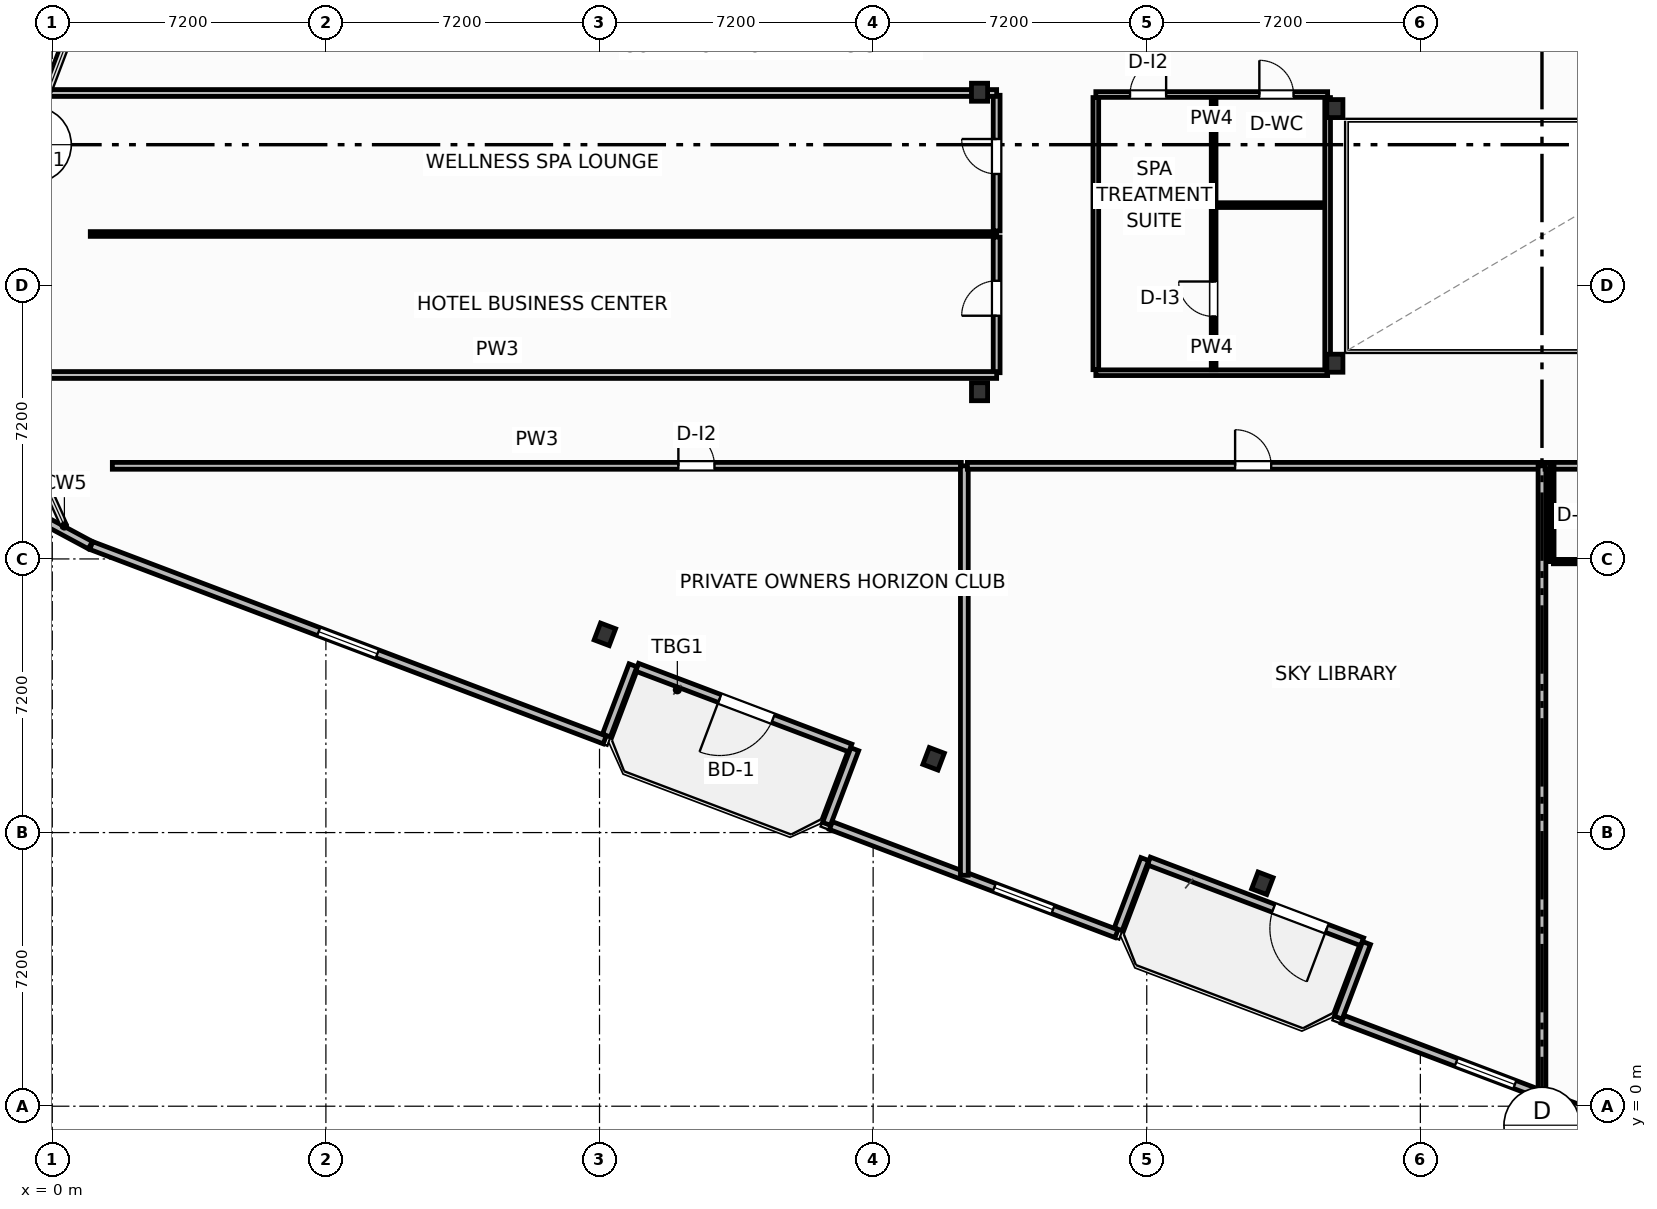
"""IFC4 building model, lengths in metres.
Left out: names, types, materials, properties, quantities, classifications, styles, units other than length and angle.
Written with IfcOpenShell. Run it as: python <this file> out.ifc"""

import sys

from ifc_helpers import new_model, si_unit, direction, frame, frame_2d, origin, origin_2d, place, context, subcontext, project, spatial, rectangle, i_section, extrude, element, fill, save


model = new_model("IFC4")
c1 = context("Model", 3, precision=1e-05, world=origin(), true_north=direction((0.0, 1.0)))
c2 = subcontext(c1, "Body", "Model", "MODEL_VIEW")
j1 = project(units=[si_unit("LENGTHUNIT", "METRE"), si_unit("PLANEANGLEUNIT", "RADIAN")], contexts=[c1])
p1 = place(None, origin())
s1 = spatial("IfcSite", under=j1, at=p1, CompositionType="ELEMENT")
p2 = place(p1, origin())
s2 = spatial("IfcBuilding", under=s1, at=p2, CompositionType="ELEMENT")
p3 = place(p2, frame((0.0, 0.0, 105.8)))
s3 = spatial("IfcBuildingStorey", under=s2, at=p3, CompositionType="ELEMENT", Elevation=105.8)
for number, where, z_axis, x_axis in (
    (1, (33.75, 19.55, 0.0), (0.0, 0.0, 1.0), (1.0, 0.0, 0.0)),
    (2, (33.75, 26.25, 0.0), (0.0, 0.0, 1.0), (1.0, 0.0, 0.0)),
    (3, (24.4, 18.8, 0.0), (0.0, 0.0, 1.0), (1.0, 0.0, 0.0)),
    (4, (24.4, 26.68, 0.0), (0.0, 0.0, 1.0), (1.0, 0.0, 0.0)),
    (5, (14.541, 12.416, 0.0), (0.0, 0.0, 1.0), (0.935, -0.354, 0.0)),
    (6, (23.192, 9.141, 0.0), (0.0, 0.0, 1.0), (0.935, -0.354, 0.0)),
    (7, (31.843, 5.866, 0.0), (0.0, 0.0, 1.0), (0.935, -0.354, 0.0)),
):
    element("IfcColumn", number, at=place(p3, frame(where, z_axis=z_axis, x_axis=x_axis)), inside=s3, PredefinedType="COLUMN", context=c2, shape_type="SweptSolid", body=[
        extrude(i_section(OverallWidth=0.424, OverallDepth=0.474, WebThickness=0.048, FlangeThickness=0.077, FilletRadius=0.025, at=origin_2d()), origin(), (0.0, 0.0, 1.0), 3.7),
    ])
p4 = place(p3, frame((21.0, 9.425, 0.0), z_axis=(0.0, 0.0, 1.0), x_axis=(-0.93521416643, 0.354082565101, 0.0)))
e8 = element("IfcWall", 8, at=p4, inside=s3, PredefinedType="SOLIDWALL", context=c2, shape_type="SweptSolid", body=[
    extrude(rectangle(XDim=6.0, YDim=0.22, at=frame_2d((3.0, 0.0))), origin(), (0.0, 0.0, 1.0), 2.73),
])
p5 = place(p4, frame((2.176, 0.0, 0.0)))
e9 = element("IfcOpeningElement", 9, at=p5, cuts=e8, PredefinedType="OPENING", context=c2, shape_type="SweptSolid", body=[
    extrude(rectangle(XDim=1.5, YDim=2.25, at=frame_2d((0.75, 1.125))), frame((0.0, 0.12, 0.0), z_axis=(0.0, -1.0, 0.0), x_axis=(1.0, 0.0, 0.0)), (0.0, 0.0, 1.0), 0.24),
])
p6 = place(p3, frame((34.468, 4.327, 0.0), z_axis=(0.0, 0.0, 1.0), x_axis=(-0.9352192676, 0.354069091436, 0.0)))
e10 = element("IfcWall", 10, at=p6, inside=s3, PredefinedType="SOLIDWALL", context=c2, shape_type="SweptSolid", body=[
    extrude(rectangle(XDim=6.0, YDim=0.22, at=frame_2d((3.0, 0.0))), origin(), (0.0, 0.0, 1.0), 2.73),
])
p7 = place(p6, frame((0.992, 0.0, 0.0)))
e11 = element("IfcOpeningElement", 11, at=p7, cuts=e10, PredefinedType="OPENING", context=c2, shape_type="SweptSolid", body=[
    extrude(rectangle(XDim=1.5, YDim=2.25, at=frame_2d((0.75, 1.125))), frame((0.0, 0.12, 0.0), z_axis=(0.0, -1.0, 0.0), x_axis=(1.0, 0.0, 0.0)), (0.0, 0.0, 1.0), 0.24),
])
p8 = place(p3, frame((-0.197, 15.406, 0.0), z_axis=(0.0, 0.0, 1.0), x_axis=(0.881023507585, -0.47307248819, 0.0)))
e12 = element("IfcWall", 12, at=p8, inside=s3, PredefinedType="SOLIDWALL", context=c2, shape_type="SweptSolid", body=[
    extrude(rectangle(XDim=1.361, YDim=0.22, at=frame_2d((0.68, 0.0))), origin(), (0.0, 0.0, 1.0), 2.73),
])
p9 = place(p3, frame((1.026, 14.753, 0.0), z_axis=(0.0, 0.0, 1.0), x_axis=(0.935222448475, -0.354060689526, 0.0)))
e13 = element("IfcWall", 13, at=p9, inside=s3, PredefinedType="SOLIDWALL", context=c2, shape_type="SweptSolid", body=[
    extrude(rectangle(XDim=14.447, YDim=0.22, at=frame_2d((7.224, 0.0))), origin(), (0.0, 0.0, 1.0), 2.73),
])
p10 = place(p9, frame((6.399, 0.0, 0.8)))
e14 = element("IfcOpeningElement", 14, at=p10, cuts=e13, PredefinedType="OPENING", context=c2, shape_type="SweptSolid", body=[
    extrude(rectangle(XDim=1.65, YDim=1.65, at=frame_2d((0.825, 0.825))), frame((0.0, 0.12, 0.0), z_axis=(0.0, -1.0, 0.0), x_axis=(1.0, 0.0, 0.0)), (0.0, 0.0, 1.0), 0.24),
])
p11 = place(p3, frame((14.581, 9.755, 0.0), z_axis=(0.0, 0.0, 1.0), x_axis=(0.354061611705, 0.935222099352, 0.0)))
e15 = element("IfcWall", 15, at=p11, inside=s3, PredefinedType="SOLIDWALL", context=c2, shape_type="SweptSolid", body=[
    extrude(rectangle(XDim=1.975, YDim=0.22, at=frame_2d((0.987, 0.0))), origin(), (0.0, 0.0, 1.0), 2.73),
])
p12 = place(p3, frame((21.116, 9.392, 0.0), z_axis=(0.0, 0.0, 1.0), x_axis=(-0.353988291547, -0.935249854022, 0.0)))
e16 = element("IfcWall", 16, at=p12, inside=s3, PredefinedType="SOLIDWALL", context=c2, shape_type="SweptSolid", body=[
    extrude(rectangle(XDim=2.1, YDim=0.22, at=frame_2d((1.05, 0.0))), origin(), (0.0, 0.0, 1.0), 2.73),
])
p13 = place(p3, frame((20.49, 7.384, 0.0), z_axis=(0.0, 0.0, 1.0), x_axis=(0.935230796934, -0.354038636968, 0.0)))
e17 = element("IfcWall", 17, at=p13, inside=s3, PredefinedType="SOLIDWALL", context=c2, shape_type="SweptSolid", body=[
    extrude(rectangle(XDim=8.035, YDim=0.22, at=frame_2d((4.018, 0.0))), origin(), (0.0, 0.0, 1.0), 2.73),
])
p14 = place(p13, frame((4.597, 0.0, 0.8)))
e18 = element("IfcOpeningElement", 18, at=p14, cuts=e17, PredefinedType="OPENING", context=c2, shape_type="SweptSolid", body=[
    extrude(rectangle(XDim=1.65, YDim=1.65, at=frame_2d((0.825, 0.825))), frame((0.0, 0.12, 0.0), z_axis=(0.0, -1.0, 0.0), x_axis=(1.0, 0.0, 0.0)), (0.0, 0.0, 1.0), 0.24),
])
p15 = place(p3, frame((28.048, 4.656, 0.0), z_axis=(0.0, 0.0, 1.0), x_axis=(0.354128791944, 0.935196663123, 0.0)))
e19 = element("IfcWall", 19, at=p15, inside=s3, PredefinedType="SOLIDWALL", context=c2, shape_type="SweptSolid", body=[
    extrude(rectangle(XDim=1.975, YDim=0.22, at=frame_2d((0.988, 0.0))), origin(), (0.0, 0.0, 1.0), 2.73),
])
p16 = place(p3, frame((34.583, 4.294, 0.0), z_axis=(0.0, 0.0, 1.0), x_axis=(-0.354128469405, -0.935196785258, 0.0)))
e20 = element("IfcWall", 20, at=p16, inside=s3, PredefinedType="SOLIDWALL", context=c2, shape_type="SweptSolid", body=[
    extrude(rectangle(XDim=2.1, YDim=0.22, at=frame_2d((1.05, 0.0))), origin(), (0.0, 0.0, 1.0), 2.73),
])
p17 = place(p3, frame((33.957, 2.286, 0.0), z_axis=(0.0, 0.0, 1.0), x_axis=(0.935220736163, -0.354065212427, 0.0)))
e21 = element("IfcWall", 21, at=p17, inside=s3, PredefinedType="SOLIDWALL", context=c2, shape_type="SweptSolid", body=[
    extrude(rectangle(XDim=8.035, YDim=0.22, at=frame_2d((4.018, 0.0))), origin(), (0.0, 0.0, 1.0), 2.73),
])
p18 = place(p17, frame((3.192, 0.0, 0.8)))
e22 = element("IfcOpeningElement", 22, at=p18, cuts=e21, PredefinedType="OPENING", context=c2, shape_type="SweptSolid", body=[
    extrude(rectangle(XDim=1.65, YDim=1.65, at=frame_2d((0.825, 0.825))), frame((0.0, 0.12, 0.0), z_axis=(0.0, -1.0, 0.0), x_axis=(1.0, 0.0, 0.0)), (0.0, 0.0, 1.0), 0.24),
])
p19 = place(p3, frame((1.58, 16.85, 0.0), z_axis=(0.0, 0.0, 1.0), x_axis=(1.0, 0.0, 0.0)))
e23 = element("IfcWall", 23, at=p19, inside=s3, PredefinedType="PARTITIONING", context=c2, shape_type="SweptSolid", body=[
    extrude(rectangle(XDim=22.34, YDim=0.18, at=frame_2d((11.17, 0.0))), origin(), (0.0, 0.0, 1.0), 3.45),
])
p20 = place(p19, frame((14.895, 0.0, 0.0)))
e24 = element("IfcOpeningElement", 24, at=p20, cuts=e23, PredefinedType="OPENING", context=c2, shape_type="SweptSolid", body=[
    extrude(rectangle(XDim=0.95, YDim=2.05, at=frame_2d((0.475, 1.025))), frame((0.0, 0.1, 0.0), z_axis=(0.0, -1.0, 0.0), x_axis=(1.0, 0.0, 0.0)), (0.0, 0.0, 1.0), 0.2),
])
p21 = place(p3, frame((24.0, 6.076, 0.0), z_axis=(0.0, 0.0, 1.0), x_axis=(0.0, 1.0, 0.0)))
e25 = element("IfcWall", 25, at=p21, inside=s3, PredefinedType="PARTITIONING", context=c2, shape_type="SweptSolid", body=[
    extrude(rectangle(XDim=10.774, YDim=0.205, at=frame_2d((5.387, 0.0))), origin(), (0.0, 0.0, 1.0), 2.58),
])
p22 = place(p3, frame((24.08, 16.85, 0.0), z_axis=(0.0, 0.0, 1.0), x_axis=(1.0, 0.0, 0.0)))
e26 = element("IfcWall", 26, at=p22, inside=s3, PredefinedType="PARTITIONING", context=c2, shape_type="SweptSolid", body=[
    extrude(rectangle(XDim=15.04, YDim=0.18, at=frame_2d((7.52, 0.0))), origin(), (0.0, 0.0, 1.0), 3.45),
])
p23 = place(p22, frame((7.045, 0.0, 0.0)))
e27 = element("IfcOpeningElement", 27, at=p23, cuts=e26, PredefinedType="OPENING", context=c2, shape_type="SweptSolid", body=[
    extrude(rectangle(XDim=0.95, YDim=2.05, at=frame_2d((0.475, 1.025))), frame((0.0, 0.1, 0.0), z_axis=(0.0, -1.0, 0.0), x_axis=(1.0, 0.0, 0.0)), (0.0, 0.0, 1.0), 0.2),
])
p24 = place(p3, frame((39.2, 0.322, 0.0), z_axis=(0.0, 0.0, 1.0), x_axis=(0.0, 1.0, 0.0)))
e28 = element("IfcWall", 28, at=p24, inside=s3, PredefinedType="PARTITIONING", context=c2, shape_type="SweptSolid", body=[
    extrude(rectangle(XDim=16.528, YDim=0.205, at=frame_2d((8.264, 0.0))), origin(), (0.0, 0.0, 1.0), 3.45),
])
p25 = place(p3, frame((39.28, 16.85, 0.0), z_axis=(0.0, 0.0, 1.0), x_axis=(1.0, 0.0, 0.0)))
e29 = element("IfcWall", 29, at=p25, inside=s3, PredefinedType="PARTITIONING", context=c2, shape_type="SweptSolid", body=[
    extrude(rectangle(XDim=14.64, YDim=0.18, at=frame_2d((7.32, 0.0))), origin(), (0.0, 0.0, 1.0), 3.45),
])
p26 = place(p25, frame((3.322, 0.0, 0.0)))
e30 = element("IfcOpeningElement", 30, at=p26, cuts=e29, PredefinedType="OPENING", context=c2, shape_type="SweptSolid", body=[
    extrude(rectangle(XDim=0.95, YDim=2.15, at=frame_2d((0.475, 1.075))), frame((0.0, 0.1, 0.0), z_axis=(0.0, -1.0, 0.0), x_axis=(1.0, 0.0, 0.0)), (0.0, 0.0, 1.0), 0.2),
])
p27 = place(p3, frame((39.5, 14.33, 0.0), z_axis=(0.0, 0.0, 1.0), x_axis=(1.0, 0.0, 0.0)))
e31 = element("IfcWall", 31, at=p27, inside=s3, PredefinedType="PARTITIONING", context=c2, shape_type="SweptSolid", body=[
    extrude(rectangle(XDim=2.15, YDim=0.115, at=frame_2d((1.075, 0.0))), origin(), (0.0, 0.0, 1.0), 3.45),
])
p28 = place(p3, frame((39.46, 14.33, 0.0), z_axis=(0.0, 0.0, 1.0), x_axis=(0.0, 1.0, 0.0)))
e32 = element("IfcWall", 32, at=p28, inside=s3, PredefinedType="PARTITIONING", context=c2, shape_type="SweptSolid", body=[
    extrude(rectangle(XDim=2.52, YDim=0.115, at=frame_2d((1.26, 0.0))), origin(), (0.0, 0.0, 1.0), 3.45),
])
p29 = place(p3, frame((24.85, 19.3, 0.0), z_axis=(0.0, 0.0, 1.0), x_axis=(0.0, 1.0, 0.0)))
e33 = element("IfcWall", 33, at=p29, inside=s3, PredefinedType="PARTITIONING", context=c2, shape_type="SweptSolid", body=[
    extrude(rectangle(XDim=3.57, YDim=0.18, at=frame_2d((1.785, 0.0))), origin(), (0.0, 0.0, 1.0), 3.45),
])
p30 = place(p29, frame((1.5, 0.0, 0.0)))
e34 = element("IfcOpeningElement", 34, at=p30, cuts=e33, PredefinedType="OPENING", context=c2, shape_type="SweptSolid", body=[
    extrude(rectangle(XDim=0.92, YDim=2.05, at=frame_2d((0.46, 1.025))), frame((0.0, 0.1, 0.0), z_axis=(0.0, -1.0, 0.0), x_axis=(1.0, 0.0, 0.0)), (0.0, 0.0, 1.0), 0.2),
])
p31 = place(p3, frame((24.85, 23.03, 0.0), z_axis=(0.0, 0.0, 1.0), x_axis=(0.0, 1.0, 0.0)))
e35 = element("IfcWall", 35, at=p31, inside=s3, PredefinedType="PARTITIONING", context=c2, shape_type="SweptSolid", body=[
    extrude(rectangle(XDim=3.57, YDim=0.18, at=frame_2d((1.785, 0.0))), origin(), (0.0, 0.0, 1.0), 3.45),
])
p32 = place(p31, frame((1.5, 0.0, 0.0)))
e36 = element("IfcOpeningElement", 36, at=p32, cuts=e35, PredefinedType="OPENING", context=c2, shape_type="SweptSolid", body=[
    extrude(rectangle(XDim=0.92, YDim=2.05, at=frame_2d((0.46, 1.025))), frame((0.0, 0.1, 0.0), z_axis=(0.0, -1.0, 0.0), x_axis=(1.0, 0.0, 0.0)), (0.0, 0.0, 1.0), 0.2),
])
p33 = place(p3, frame((1.0, 22.95, 0.0), z_axis=(0.0, 0.0, 1.0), x_axis=(1.0, 0.0, 0.0)))
e37 = element("IfcWall", 37, at=p33, inside=s3, PredefinedType="PARTITIONING", context=c2, shape_type="SweptSolid", body=[
    extrude(rectangle(XDim=23.85, YDim=0.125, at=frame_2d((11.925, 0.0))), origin(), (0.0, 0.0, 1.0), 3.45),
])
p34 = place(p3, frame((-1.432, 19.24, 0.0), z_axis=(0.0, 0.0, 1.0), x_axis=(1.0, 0.0, 0.0)))
e38 = element("IfcWall", 38, at=p34, inside=s3, PredefinedType="PARTITIONING", context=c2, shape_type="SweptSolid", body=[
    extrude(rectangle(XDim=26.282, YDim=0.18, at=frame_2d((13.141, 0.0))), origin(), (0.0, 0.0, 1.0), 3.45),
])
p35 = place(p3, frame((-0.086, 26.66, 0.0), z_axis=(0.0, 0.0, 1.0), x_axis=(1.0, 0.0, 0.0)))
e39 = element("IfcWall", 39, at=p35, inside=s3, PredefinedType="PARTITIONING", context=c2, shape_type="SweptSolid", body=[
    extrude(rectangle(XDim=24.936, YDim=0.18, at=frame_2d((12.468, 0.0))), origin(), (0.0, 0.0, 1.0), 2.662),
])
p36 = place(p3, frame((27.46, 26.62, 0.0), z_axis=(0.0, 0.0, 1.0), x_axis=(1.0, 0.0, 0.0)))
e40 = element("IfcWall", 40, at=p36, inside=s3, PredefinedType="PARTITIONING", context=c2, shape_type="SweptSolid", body=[
    extrude(rectangle(XDim=6.1, YDim=0.15, at=frame_2d((3.05, 0.0))), origin(), (0.0, 0.0, 1.0), 2.662),
])
p37 = place(p36, frame((0.9, 0.0, 0.0)))
e41 = element("IfcOpeningElement", 41, at=p37, cuts=e40, PredefinedType="OPENING", context=c2, shape_type="SweptSolid", body=[
    extrude(rectangle(XDim=0.95, YDim=2.05, at=frame_2d((0.475, 1.025))), frame((0.0, 0.085, 0.0), z_axis=(0.0, -1.0, 0.0), x_axis=(1.0, 0.0, 0.0)), (0.0, 0.0, 1.0), 0.17),
])
p38 = place(p36, frame((4.303, 0.0, 0.0)))
e42 = element("IfcOpeningElement", 42, at=p38, cuts=e40, PredefinedType="OPENING", context=c2, shape_type="SweptSolid", body=[
    extrude(rectangle(XDim=0.9, YDim=2.05, at=frame_2d((0.45, 1.025))), frame((0.0, 0.085, 0.0), z_axis=(0.0, -1.0, 0.0), x_axis=(1.0, 0.0, 0.0)), (0.0, 0.0, 1.0), 0.17),
])
p39 = place(p3, frame((27.46, 19.3, 0.0), z_axis=(0.0, 0.0, 1.0), x_axis=(1.0, 0.0, 0.0)))
e43 = element("IfcWall", 43, at=p39, inside=s3, PredefinedType="PARTITIONING", context=c2, shape_type="SweptSolid", body=[
    extrude(rectangle(XDim=6.1, YDim=0.15, at=frame_2d((3.05, 0.0))), origin(), (0.0, 0.0, 1.0), 2.662),
])
p40 = place(p3, frame((30.56, 19.38, 0.0), z_axis=(0.0, 0.0, 1.0), x_axis=(0.0, 1.0, 0.0)))
e44 = element("IfcWall", 44, at=p40, inside=s3, PredefinedType="PARTITIONING", context=c2, shape_type="SweptSolid", body=[
    extrude(rectangle(XDim=7.16, YDim=0.125, at=frame_2d((3.58, 0.0))), origin(), (0.0, 0.0, 1.0), 3.45),
])
p41 = place(p40, frame((1.4, 0.0, 0.0)))
e45 = element("IfcOpeningElement", 45, at=p41, cuts=e44, PredefinedType="OPENING", context=c2, shape_type="SweptSolid", body=[
    extrude(rectangle(XDim=0.92, YDim=2.05, at=frame_2d((0.46, 1.025))), frame((0.0, 0.073, 0.0), z_axis=(0.0, -1.0, 0.0), x_axis=(1.0, 0.0, 0.0)), (0.0, 0.0, 1.0), 0.145),
])
p42 = place(p3, frame((30.64, 23.71, 0.0), z_axis=(0.0, 0.0, 1.0), x_axis=(1.0, 0.0, 0.0)))
e46 = element("IfcWall", 46, at=p42, inside=s3, PredefinedType="PARTITIONING", context=c2, shape_type="SweptSolid", body=[
    extrude(rectangle(XDim=2.88, YDim=0.125, at=frame_2d((1.44, 0.0))), origin(), (0.0, 0.0, 1.0), 3.45),
])
p43 = place(p3, frame((27.46, 19.38, 0.0), z_axis=(0.0, 0.0, 1.0), x_axis=(0.0, 1.0, 0.0)))
e47 = element("IfcWall", 47, at=p43, inside=s3, PredefinedType="PARTITIONING", context=c2, shape_type="SweptSolid", body=[
    extrude(rectangle(XDim=7.16, YDim=0.15, at=frame_2d((3.58, 0.0))), origin(), (0.0, 0.0, 1.0), 3.45),
])
p44 = place(p3, frame((33.56, 19.38, 0.0), z_axis=(0.0, 0.0, 1.0), x_axis=(0.0, 1.0, 0.0)))
e48 = element("IfcWall", 48, at=p44, inside=s3, PredefinedType="PARTITIONING", context=c2, shape_type="SweptSolid", body=[
    extrude(rectangle(XDim=7.16, YDim=0.15, at=frame_2d((3.58, 0.0))), origin(), (0.0, 0.0, 1.0), 2.824),
])
p45 = place(p5, origin())
e49 = element("IfcDoor", 49, at=p45, inside=s3, OperationType="SINGLE_SWING_RIGHT", PredefinedType="DOOR", context=c2, shape_type="SweptSolid", body=[
    extrude(rectangle(XDim=1.5, YDim=2.25, at=frame_2d((0.75, 1.125))), frame((0.0, 0.025, 0.0), z_axis=(0.0, -1.0, 0.0), x_axis=(1.0, 0.0, 0.0)), (0.0, 0.0, 1.0), 0.05),
])
fill(e9, e49)
p46 = place(p7, origin())
e50 = element("IfcDoor", 50, at=p46, inside=s3, OperationType="SINGLE_SWING_LEFT", PredefinedType="DOOR", context=c2, shape_type="SweptSolid", body=[
    extrude(rectangle(XDim=1.5, YDim=2.25, at=frame_2d((0.75, 1.125))), frame((0.0, 0.025, 0.0), z_axis=(0.0, -1.0, 0.0), x_axis=(1.0, 0.0, 0.0)), (0.0, 0.0, 1.0), 0.05),
])
fill(e11, e50)
p47 = place(p10, origin())
e51 = element("IfcWindow", 51, at=p47, inside=s3, PartitioningType="SINGLE_PANEL", PredefinedType="WINDOW", context=c2, shape_type="SweptSolid", body=[
    extrude(rectangle(XDim=1.65, YDim=1.65, at=frame_2d((0.825, 0.825))), frame((0.0, 0.03, 0.0), z_axis=(0.0, -1.0, 0.0), x_axis=(1.0, 0.0, 0.0)), (0.0, 0.0, 1.0), 0.06),
])
fill(e14, e51)
p48 = place(p14, origin())
e52 = element("IfcWindow", 52, at=p48, inside=s3, PartitioningType="SINGLE_PANEL", PredefinedType="WINDOW", context=c2, shape_type="SweptSolid", body=[
    extrude(rectangle(XDim=1.65, YDim=1.65, at=frame_2d((0.825, 0.825))), frame((0.0, 0.03, 0.0), z_axis=(0.0, -1.0, 0.0), x_axis=(1.0, 0.0, 0.0)), (0.0, 0.0, 1.0), 0.06),
])
fill(e18, e52)
p49 = place(p18, origin())
e53 = element("IfcWindow", 53, at=p49, inside=s3, PartitioningType="SINGLE_PANEL", PredefinedType="WINDOW", context=c2, shape_type="SweptSolid", body=[
    extrude(rectangle(XDim=1.65, YDim=1.65, at=frame_2d((0.825, 0.825))), frame((0.0, 0.03, 0.0), z_axis=(0.0, -1.0, 0.0), x_axis=(1.0, 0.0, 0.0)), (0.0, 0.0, 1.0), 0.06),
])
fill(e22, e53)
p50 = place(p20, origin())
e54 = element("IfcDoor", 54, at=p50, inside=s3, OperationType="SINGLE_SWING_LEFT", PredefinedType="DOOR", context=c2, shape_type="SweptSolid", body=[
    extrude(rectangle(XDim=0.95, YDim=2.05, at=frame_2d((0.475, 1.025))), frame((0.0, 0.025, 0.0), z_axis=(0.0, -1.0, 0.0), x_axis=(1.0, 0.0, 0.0)), (0.0, 0.0, 1.0), 0.05),
])
fill(e24, e54)
p51 = place(p23, origin())
e55 = element("IfcDoor", 55, at=p51, inside=s3, OperationType="SINGLE_SWING_LEFT", PredefinedType="DOOR", context=c2, shape_type="SweptSolid", body=[
    extrude(rectangle(XDim=0.95, YDim=2.05, at=frame_2d((0.475, 1.025))), frame((0.0, 0.025, 0.0), z_axis=(0.0, -1.0, 0.0), x_axis=(1.0, 0.0, 0.0)), (0.0, 0.0, 1.0), 0.05),
])
fill(e27, e55)
p52 = place(p30, origin())
e56 = element("IfcDoor", 56, at=p52, inside=s3, OperationType="SINGLE_SWING_LEFT", PredefinedType="DOOR", context=c2, shape_type="SweptSolid", body=[
    extrude(rectangle(XDim=0.92, YDim=2.05, at=frame_2d((0.46, 1.025))), frame((0.0, 0.025, 0.0), z_axis=(0.0, -1.0, 0.0), x_axis=(1.0, 0.0, 0.0)), (0.0, 0.0, 1.0), 0.05),
])
fill(e34, e56)
p53 = place(p32, origin())
e57 = element("IfcDoor", 57, at=p53, inside=s3, OperationType="SINGLE_SWING_RIGHT", PredefinedType="DOOR", context=c2, shape_type="SweptSolid", body=[
    extrude(rectangle(XDim=0.92, YDim=2.05, at=frame_2d((0.46, 1.025))), frame((0.0, 0.025, 0.0), z_axis=(0.0, -1.0, 0.0), x_axis=(1.0, 0.0, 0.0)), (0.0, 0.0, 1.0), 0.05),
])
fill(e36, e57)
p54 = place(p37, origin())
e58 = element("IfcDoor", 58, at=p54, inside=s3, OperationType="SINGLE_SWING_RIGHT", PredefinedType="DOOR", context=c2, shape_type="SweptSolid", body=[
    extrude(rectangle(XDim=0.95, YDim=2.05, at=frame_2d((0.475, 1.025))), frame((0.0, 0.025, 0.0), z_axis=(0.0, -1.0, 0.0), x_axis=(1.0, 0.0, 0.0)), (0.0, 0.0, 1.0), 0.05),
])
fill(e41, e58)
p55 = place(p38, origin())
e59 = element("IfcDoor", 59, at=p55, inside=s3, OperationType="SINGLE_SWING_LEFT", PredefinedType="DOOR", context=c2, shape_type="SweptSolid", body=[
    extrude(rectangle(XDim=0.9, YDim=2.05, at=frame_2d((0.45, 1.025))), frame((0.0, 0.025, 0.0), z_axis=(0.0, -1.0, 0.0), x_axis=(1.0, 0.0, 0.0)), (0.0, 0.0, 1.0), 0.05),
])
fill(e42, e59)
p56 = place(p41, origin())
e60 = element("IfcDoor", 60, at=p56, inside=s3, OperationType="SINGLE_SWING_RIGHT", PredefinedType="DOOR", context=c2, shape_type="SweptSolid", body=[
    extrude(rectangle(XDim=0.92, YDim=2.05, at=frame_2d((0.46, 1.025))), frame((0.0, 0.025, 0.0), z_axis=(0.0, -1.0, 0.0), x_axis=(1.0, 0.0, 0.0)), (0.0, 0.0, 1.0), 0.05),
])
fill(e45, e60)
save(model, sys.argv[1])
